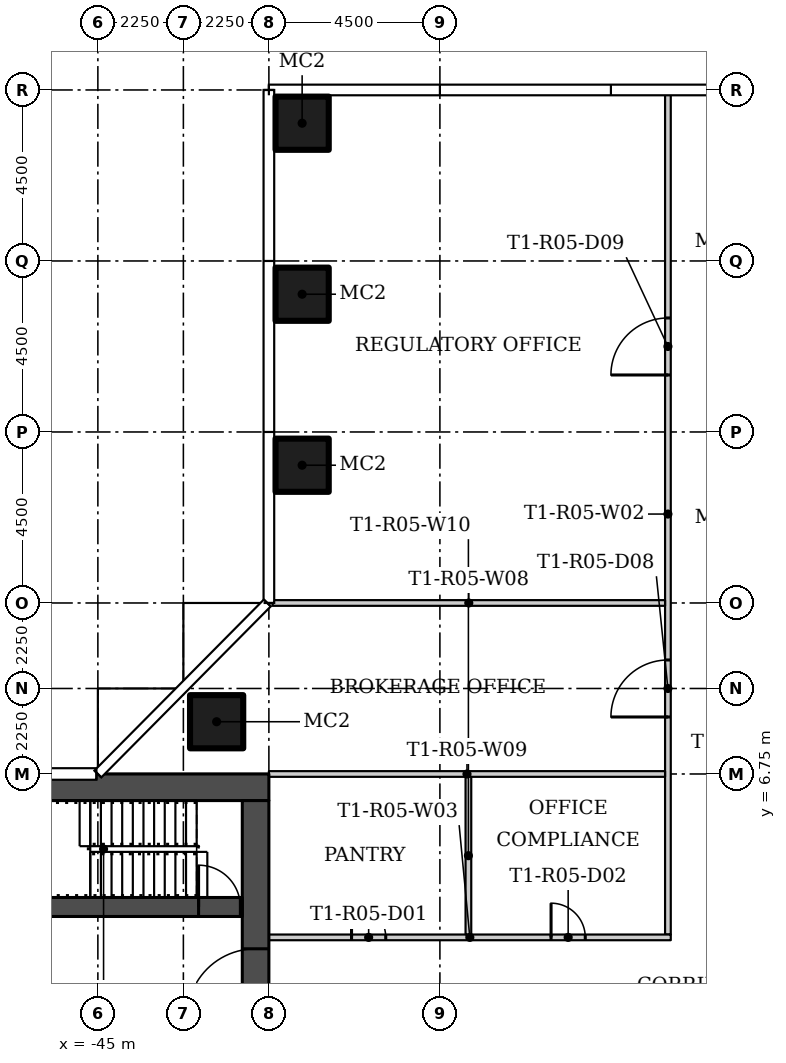
"""IFC4 building model, lengths in metres.
Left out: names, types, materials, properties, quantities, classifications, styles, units other than length and angle.
Written with IfcOpenShell. Run it as: python <this file> out.ifc"""

import sys

from ifc_helpers import new_model, si_unit, direction, frame, frame_2d, origin, origin_2d, place, context, subcontext, project, spatial, rectangle, hollow_rectangle, extrude, element, fill, save


model = new_model("IFC4")
c1 = context("Model", 3, precision=1e-05, world=origin(), true_north=direction((0.0, 1.0)))
c2 = subcontext(c1, "Body", "Model", "MODEL_VIEW")
j1 = project(units=[si_unit("LENGTHUNIT", "METRE"), si_unit("PLANEANGLEUNIT", "RADIAN")], contexts=[c1])
p1 = place(None, origin())
s1 = spatial("IfcSite", under=j1, at=p1, CompositionType="ELEMENT")
p2 = place(p1, origin())
s2 = spatial("IfcBuilding", under=s1, at=p2, CompositionType="ELEMENT")
p3 = place(p2, frame((0.0, 0.0, 57.6)))
s3 = spatial("IfcBuildingStorey", under=s2, at=p3, CompositionType="ELEMENT", Elevation=57.6)
for number, where in (
    (1, (-41.875, 8.125, 0.0)),
    (2, (-39.625, 14.875, 0.0)),
    (3, (-39.625, 19.375, 0.0)),
    (4, (-39.625, 23.875, 0.0)),
):
    element("IfcColumn", number, at=place(p3, frame(where)), inside=s3, PredefinedType="COLUMN", context=c2, shape_type="SweptSolid", body=[
        extrude(hollow_rectangle(XDim=1.4, YDim=1.4, WallThickness=0.05, at=origin_2d()), origin(), (0.0, 0.0, 1.0), 3.55),
    ])
p4 = place(p3, frame((-30.0, 2.525, 0.0), z_axis=(0.0, 0.0, 1.0), x_axis=(0.0, 1.0, 0.0)))
e5 = element("IfcWall", 5, at=p4, inside=s3, PredefinedType="PARTITIONING", context=c2, shape_type="SweptSolid", body=[
    extrude(rectangle(XDim=22.13, YDim=0.15, at=frame_2d((11.065, 0.0))), origin(), (0.0, 0.0, 1.0), 3.55),
])
p5 = place(p4, frame((5.725, 0.0, 0.0)))
e6 = element("IfcOpeningElement", 6, at=p5, cuts=e5, PredefinedType="OPENING", context=c2, shape_type="SweptSolid", body=[
    extrude(rectangle(XDim=1.5, YDim=2.1, at=frame_2d((0.75, 1.05))), frame((0.0, 0.085, 0.0), z_axis=(0.0, -1.0, 0.0), x_axis=(1.0, 0.0, 0.0)), (0.0, 0.0, 1.0), 0.17),
])
p6 = place(p4, frame((14.725, 0.0, 0.0)))
e7 = element("IfcOpeningElement", 7, at=p6, cuts=e5, PredefinedType="OPENING", context=c2, shape_type="SweptSolid", body=[
    extrude(rectangle(XDim=1.5, YDim=2.1, at=frame_2d((0.75, 1.05))), frame((0.0, 0.085, 0.0), z_axis=(0.0, -1.0, 0.0), x_axis=(1.0, 0.0, 0.0)), (0.0, 0.0, 1.0), 0.17),
])
p7 = place(p3, frame((-40.5, 2.45, 0.0)))
e8 = element("IfcWall", 8, at=p7, inside=s3, PredefinedType="PARTITIONING", context=c2, shape_type="SweptSolid", body=[
    extrude(rectangle(XDim=10.575, YDim=0.15, at=frame_2d((5.288, 0.0))), origin(), (0.0, 0.0, 1.0), 3.55),
])
p8 = place(p7, frame((2.175, 0.0, 0.0)))
e9 = element("IfcOpeningElement", 9, at=p8, cuts=e8, PredefinedType="OPENING", context=c2, shape_type="SweptSolid", body=[
    extrude(rectangle(XDim=0.9, YDim=2.1, at=frame_2d((0.45, 1.05))), frame((0.0, 0.085, 0.0), z_axis=(0.0, -1.0, 0.0), x_axis=(1.0, 0.0, 0.0)), (0.0, 0.0, 1.0), 0.17),
])
p9 = place(p7, frame((7.425, 0.0, 0.0)))
e10 = element("IfcOpeningElement", 10, at=p9, cuts=e8, PredefinedType="OPENING", context=c2, shape_type="SweptSolid", body=[
    extrude(rectangle(XDim=0.9, YDim=2.1, at=frame_2d((0.45, 1.05))), frame((0.0, 0.085, 0.0), z_axis=(0.0, -1.0, 0.0), x_axis=(1.0, 0.0, 0.0)), (0.0, 0.0, 1.0), 0.17),
])
p10 = place(p3, frame((-30.075, 11.25, 0.0), z_axis=(0.0, 0.0, 1.0), x_axis=(-1.0, 0.0, 0.0)))
e11 = element("IfcWall", 11, at=p10, inside=s3, PredefinedType="PARTITIONING", context=c2, shape_type="SweptSolid", body=[
    extrude(rectangle(XDim=10.33, YDim=0.15, at=frame_2d((5.165, 0.0))), origin(), (0.0, 0.0, 1.0), 3.55),
])
p11 = place(p3, frame((-40.5, 6.75, 0.0)))
e12 = element("IfcWall", 12, at=p11, inside=s3, PredefinedType="PARTITIONING", context=c2, shape_type="SweptSolid", body=[
    extrude(rectangle(XDim=10.425, YDim=0.15, at=frame_2d((5.212, 0.0))), origin(), (0.0, 0.0, 1.0), 3.55),
])
p12 = place(p3, frame((-35.25, 2.525, 0.0), z_axis=(0.0, 0.0, 1.0), x_axis=(0.0, 1.0, 0.0)))
e13 = element("IfcWall", 13, at=p12, inside=s3, PredefinedType="PARTITIONING", context=c2, shape_type="SweptSolid", body=[
    extrude(rectangle(XDim=4.15, YDim=0.15, at=frame_2d((2.075, 0.0))), origin(), (0.0, 0.0, 1.0), 3.55),
])
p13 = place(p3, frame((-40.5, 6.4, 0.0), z_axis=(0.0, 0.0, 1.0), x_axis=(-1.0, 0.0, 0.0)))
e14 = element("IfcWall", 14, at=p13, inside=s3, PredefinedType="SHEAR", context=c2, shape_type="SweptSolid", body=[
    extrude(rectangle(XDim=13.5, YDim=0.7, at=frame_2d((6.75, 0.0))), origin(), (0.0, 0.0, 1.0), 3.55),
])
p14 = place(p3, frame((-40.85, -6.05, 0.0), z_axis=(0.0, 0.0, 1.0), x_axis=(0.0, 1.0, 0.0)))
e15 = element("IfcWall", 15, at=p14, inside=s3, PredefinedType="SHEAR", context=c2, shape_type="SweptSolid", body=[
    extrude(rectangle(XDim=12.1, YDim=0.7, at=frame_2d((6.05, 0.0))), origin(), (0.0, 0.0, 1.0), 3.55),
])
p15 = place(p14, frame((6.4, 0.0, 0.0)))
e16 = element("IfcOpeningElement", 16, at=p15, cuts=e15, PredefinedType="OPENING", context=c2, shape_type="SweptSolid", body=[
    extrude(rectangle(XDim=1.8, YDim=2.4, at=frame_2d((0.9, 1.2))), frame((0.0, 0.36, 0.0), z_axis=(0.0, -1.0, 0.0), x_axis=(1.0, 0.0, 0.0)), (0.0, 0.0, 1.0), 0.72),
])
p16 = place(p3, frame((-48.5, 3.25, 0.0)))
e17 = element("IfcWall", 17, at=p16, inside=s3, PredefinedType="SHEAR", context=c2, shape_type="SweptSolid", body=[
    extrude(rectangle(XDim=7.3, YDim=0.5, at=frame_2d((3.65, 0.0))), origin(), (0.0, 0.0, 1.0), 3.55),
])
p17 = place(p16, frame((6.15, 0.0, 0.0)))
e18 = element("IfcOpeningElement", 18, at=p17, cuts=e17, PredefinedType="OPENING", context=c2, shape_type="SweptSolid", body=[
    extrude(rectangle(XDim=1.1, YDim=2.1, at=frame_2d((0.55, 1.05))), frame((0.0, 0.26, 0.0), z_axis=(0.0, -1.0, 0.0), x_axis=(1.0, 0.0, 0.0)), (0.0, 0.0, 1.0), 0.52),
])
p18 = place(p8, origin())
e19 = element("IfcDoor", 19, at=p18, inside=s3, OperationType="SINGLE_SWING_LEFT", PredefinedType="DOOR", context=c2, shape_type="SweptSolid", body=[
    extrude(rectangle(XDim=0.9, YDim=2.1, at=frame_2d((0.45, 1.05))), frame((0.0, 0.025, 0.0), z_axis=(0.0, -1.0, 0.0), x_axis=(1.0, 0.0, 0.0)), (0.0, 0.0, 1.0), 0.05),
])
fill(e9, e19)
p19 = place(p9, origin())
e20 = element("IfcDoor", 20, at=p19, inside=s3, OperationType="SINGLE_SWING_RIGHT", PredefinedType="DOOR", context=c2, shape_type="SweptSolid", body=[
    extrude(rectangle(XDim=0.9, YDim=2.1, at=frame_2d((0.45, 1.05))), frame((0.0, 0.025, 0.0), z_axis=(0.0, -1.0, 0.0), x_axis=(1.0, 0.0, 0.0)), (0.0, 0.0, 1.0), 0.05),
])
fill(e10, e20)
p20 = place(p5, origin())
e21 = element("IfcDoor", 21, at=p20, inside=s3, OperationType="DOUBLE_DOOR_SINGLE_SWING", PredefinedType="DOOR", context=c2, shape_type="SweptSolid", body=[
    extrude(rectangle(XDim=1.5, YDim=2.1, at=frame_2d((0.75, 1.05))), frame((0.0, 0.025, 0.0), z_axis=(0.0, -1.0, 0.0), x_axis=(1.0, 0.0, 0.0)), (0.0, 0.0, 1.0), 0.05),
])
fill(e6, e21)
p21 = place(p6, origin())
e22 = element("IfcDoor", 22, at=p21, inside=s3, OperationType="DOUBLE_DOOR_SINGLE_SWING", PredefinedType="DOOR", context=c2, shape_type="SweptSolid", body=[
    extrude(rectangle(XDim=1.5, YDim=2.1, at=frame_2d((0.75, 1.05))), frame((0.0, 0.025, 0.0), z_axis=(0.0, -1.0, 0.0), x_axis=(1.0, 0.0, 0.0)), (0.0, 0.0, 1.0), 0.05),
])
fill(e7, e22)
p22 = place(p15, origin())
e23 = element("IfcDoor", 23, at=p22, inside=s3, OperationType="DOUBLE_DOOR_SINGLE_SWING", PredefinedType="DOOR", context=c2, shape_type="SweptSolid", body=[
    extrude(rectangle(XDim=1.8, YDim=2.4, at=frame_2d((0.9, 1.2))), frame((0.0, 0.025, 0.0), z_axis=(0.0, -1.0, 0.0), x_axis=(1.0, 0.0, 0.0)), (0.0, 0.0, 1.0), 0.05),
])
fill(e16, e23)
p23 = place(p17, origin())
e24 = element("IfcDoor", 24, at=p23, inside=s3, OperationType="SINGLE_SWING_RIGHT", PredefinedType="DOOR", context=c2, shape_type="SweptSolid", body=[
    extrude(rectangle(XDim=1.1, YDim=2.1, at=frame_2d((0.55, 1.05))), frame((0.0, 0.025, 0.0), z_axis=(0.0, -1.0, 0.0), x_axis=(1.0, 0.0, 0.0)), (0.0, 0.0, 1.0), 0.05),
])
fill(e18, e24)
save(model, sys.argv[1])
